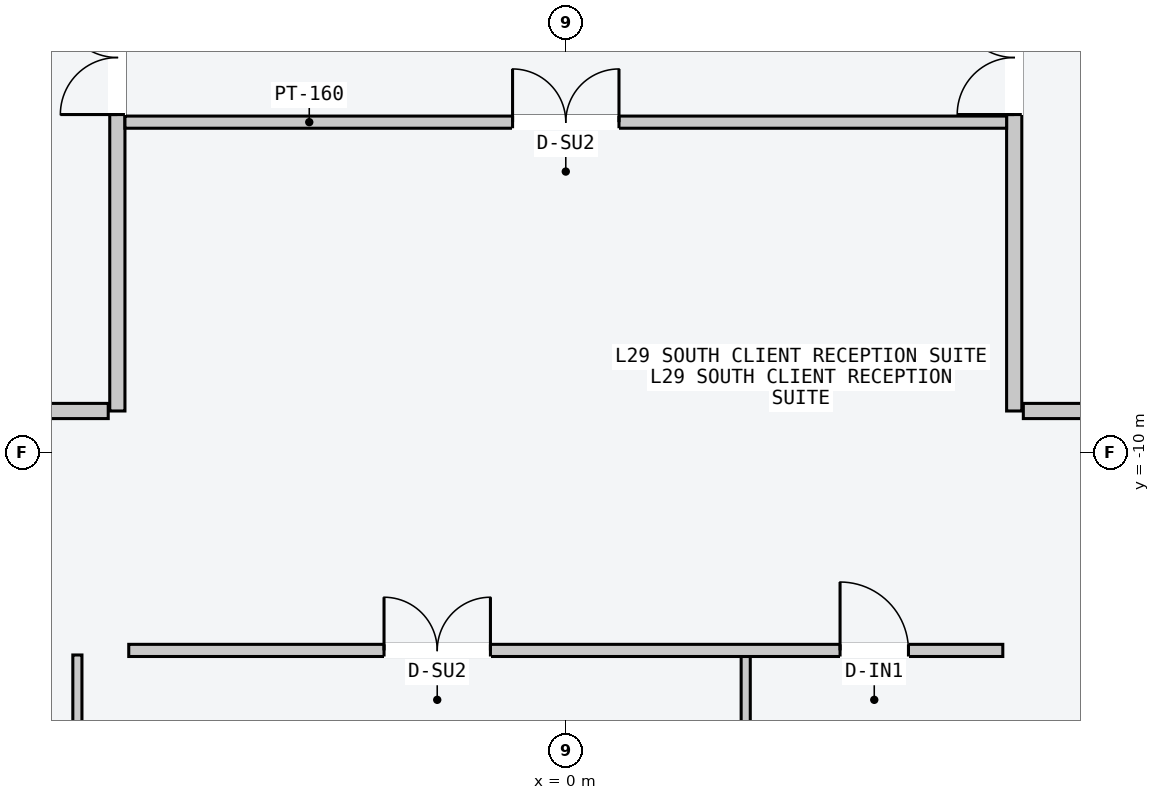
"""IFC4 building model, lengths in metres.
Left out: names, types, materials, properties, quantities, classifications, styles, units other than length and angle.
Written with IfcOpenShell. Run it as: python <this file> out.ifc"""

import sys

from ifc_helpers import new_model, si_unit, direction, frame, frame_2d, origin, place, context, subcontext, project, spatial, rectangle, extrude, element, fill, save


model = new_model("IFC4")
c1 = context("Model", 3, precision=1e-05, world=origin(), true_north=direction((0.0, 1.0)))
c2 = subcontext(c1, "Body", "Model", "MODEL_VIEW")
j1 = project(units=[si_unit("LENGTHUNIT", "METRE"), si_unit("PLANEANGLEUNIT", "RADIAN")], contexts=[c1])
p1 = place(None, origin())
s1 = spatial("IfcSite", under=j1, at=p1, CompositionType="ELEMENT")
p2 = place(p1, origin())
s2 = spatial("IfcBuilding", under=s1, at=p2, CompositionType="ELEMENT")
p3 = place(p2, frame((0.0, 0.0, 113.4)))
s3 = spatial("IfcBuildingStorey", under=s2, at=p3, CompositionType="ELEMENT", Elevation=113.4)
p4 = place(p3, frame((-5.9, -9.45, 0.0), z_axis=(0.0, 0.0, 1.0), x_axis=(0.0, 1.0, 0.0)))
e1 = element("IfcWall", 1, at=p4, inside=s3, PredefinedType="PARTITIONING", context=c2, shape_type="SweptSolid", body=[
    extrude(rectangle(XDim=10.5, YDim=0.2, at=frame_2d((5.25, 0.0))), origin(), (0.0, 0.0, 1.0), 3.4),
])
p5 = place(p4, frame((3.9, 0.0, 0.0)))
e2 = element("IfcOpeningElement", 2, at=p5, cuts=e1, PredefinedType="OPENING", context=c2, shape_type="SweptSolid", body=[
    extrude(rectangle(XDim=1.5, YDim=2.2, at=frame_2d((0.75, 1.1))), frame((0.0, 0.11, 0.0), z_axis=(0.0, -1.0, 0.0), x_axis=(1.0, 0.0, 0.0)), (0.0, 0.0, 1.0), 0.22),
])
p6 = place(p3, frame((-6.02, -9.45, 0.0), z_axis=(0.0, 0.0, 1.0), x_axis=(-1.0, 0.0, 0.0)))
e3 = element("IfcWall", 3, at=p6, inside=s3, PredefinedType="PARTITIONING", context=c2, shape_type="SweptSolid", body=[
    extrude(rectangle(XDim=1.8, YDim=0.2, at=frame_2d((0.9, 0.0))), origin(), (0.0, 0.0, 1.0), 3.4),
])
p7 = place(p3, frame((5.9, -9.45, 0.0), z_axis=(0.0, 0.0, 1.0), x_axis=(0.0, 1.0, 0.0)))
e4 = element("IfcWall", 4, at=p7, inside=s3, PredefinedType="PARTITIONING", context=c2, shape_type="SweptSolid", body=[
    extrude(rectangle(XDim=18.9, YDim=0.2, at=frame_2d((9.45, 0.0))), origin(), (0.0, 0.0, 1.0), 3.4),
])
p8 = place(p7, frame((3.9, 0.0, 0.0)))
e5 = element("IfcOpeningElement", 5, at=p8, cuts=e4, PredefinedType="OPENING", context=c2, shape_type="SweptSolid", body=[
    extrude(rectangle(XDim=1.5, YDim=2.2, at=frame_2d((0.75, 1.1))), frame((0.0, 0.11, 0.0), z_axis=(0.0, -1.0, 0.0), x_axis=(1.0, 0.0, 0.0)), (0.0, 0.0, 1.0), 0.22),
])
p9 = place(p3, frame((6.02, -9.45, 0.0), z_axis=(0.0, 0.0, 1.0), x_axis=(1.0, 0.0, 0.0)))
e6 = element("IfcWall", 6, at=p9, inside=s3, PredefinedType="PARTITIONING", context=c2, shape_type="SweptSolid", body=[
    extrude(rectangle(XDim=1.8, YDim=0.2, at=frame_2d((0.9, 0.0))), origin(), (0.0, 0.0, 1.0), 3.4),
])
p10 = place(p3, frame((-5.8, -5.65, 0.0), z_axis=(0.0, 0.0, 1.0), x_axis=(1.0, 0.0, 0.0)))
e7 = element("IfcWall", 7, at=p10, inside=s3, PredefinedType="PARTITIONING", context=c2, shape_type="SweptSolid", body=[
    extrude(rectangle(XDim=11.6, YDim=0.16, at=frame_2d((5.8, 0.0))), origin(), (0.0, 0.0, 1.0), 3.4),
])
p11 = place(p10, frame((5.1, 0.0, 0.0)))
e8 = element("IfcOpeningElement", 8, at=p11, cuts=e7, PredefinedType="OPENING", context=c2, shape_type="SweptSolid", body=[
    extrude(rectangle(XDim=1.4, YDim=2.2, at=frame_2d((0.7, 1.1))), frame((0.0, 0.09, 0.0), z_axis=(0.0, -1.0, 0.0), x_axis=(1.0, 0.0, 0.0)), (0.0, 0.0, 1.0), 0.18),
])
p12 = place(p3, frame((-6.426, -19.56, 0.0), z_axis=(0.0, 0.0, 1.0), x_axis=(0.0, 1.0, 0.0)))
e9 = element("IfcWall", 9, at=p12, inside=s3, PredefinedType="PARTITIONING", context=c2, shape_type="SweptSolid", body=[
    extrude(rectangle(XDim=6.9, YDim=0.12, at=frame_2d((3.45, 0.0))), origin(), (0.0, 0.0, 1.0), 3.4),
])
p13 = place(p12, frame((1.34, 0.0, 0.0)))
e10 = element("IfcOpeningElement", 10, at=p13, cuts=e9, PredefinedType="OPENING", context=c2, shape_type="SweptSolid", body=[
    extrude(rectangle(XDim=0.96, YDim=2.18, at=frame_2d((0.48, 1.09))), frame((0.0, 0.07, 0.0), z_axis=(0.0, -1.0, 0.0), x_axis=(1.0, 0.0, 0.0)), (0.0, 0.0, 1.0), 0.14),
])
p14 = place(p3, frame((2.367, -19.56, 0.0), z_axis=(0.0, 0.0, 1.0), x_axis=(0.0, 1.0, 0.0)))
e11 = element("IfcWall", 11, at=p14, inside=s3, PredefinedType="PARTITIONING", context=c2, shape_type="SweptSolid", body=[
    extrude(rectangle(XDim=6.9, YDim=0.12, at=frame_2d((3.45, 0.0))), origin(), (0.0, 0.0, 1.0), 3.4),
])
p15 = place(p14, frame((1.05, 0.0, 0.0)))
e12 = element("IfcOpeningElement", 12, at=p15, cuts=e11, PredefinedType="OPENING", context=c2, shape_type="SweptSolid", body=[
    extrude(rectangle(XDim=0.96, YDim=2.18, at=frame_2d((0.48, 1.09))), frame((0.0, 0.07, 0.0), z_axis=(0.0, -1.0, 0.0), x_axis=(1.0, 0.0, 0.0)), (0.0, 0.0, 1.0), 0.14),
])
p16 = place(p3, frame((-5.75, -12.6, 0.0), z_axis=(0.0, 0.0, 1.0), x_axis=(1.0, 0.0, 0.0)))
e13 = element("IfcWall", 13, at=p16, inside=s3, PredefinedType="PARTITIONING", context=c2, shape_type="SweptSolid", body=[
    extrude(rectangle(XDim=11.5, YDim=0.16, at=frame_2d((5.75, 0.0))), origin(), (0.0, 0.0, 1.0), 3.4),
])
p17 = place(p16, frame((3.359, 0.0, 0.0)))
e14 = element("IfcOpeningElement", 14, at=p17, cuts=e13, PredefinedType="OPENING", context=c2, shape_type="SweptSolid", body=[
    extrude(rectangle(XDim=1.4, YDim=2.2, at=frame_2d((0.7, 1.1))), frame((0.0, 0.09, 0.0), z_axis=(0.0, -1.0, 0.0), x_axis=(1.0, 0.0, 0.0)), (0.0, 0.0, 1.0), 0.18),
])
p18 = place(p16, frame((9.359, 0.0, 0.0)))
e15 = element("IfcOpeningElement", 15, at=p18, cuts=e13, PredefinedType="OPENING", context=c2, shape_type="SweptSolid", body=[
    extrude(rectangle(XDim=0.9, YDim=2.15, at=frame_2d((0.45, 1.075))), frame((0.0, 0.09, 0.0), z_axis=(0.0, -1.0, 0.0), x_axis=(1.0, 0.0, 0.0)), (0.0, 0.0, 1.0), 0.18),
])
p19 = place(p5, origin())
e16 = element("IfcDoor", 16, at=p19, inside=s3, OperationType="DOUBLE_DOOR_SINGLE_SWING", PredefinedType="DOOR", context=c2, shape_type="SweptSolid", body=[
    extrude(rectangle(XDim=1.5, YDim=2.2, at=frame_2d((0.75, 1.1))), frame((0.0, 0.025, 0.0), z_axis=(0.0, -1.0, 0.0), x_axis=(1.0, 0.0, 0.0)), (0.0, 0.0, 1.0), 0.05),
])
fill(e2, e16)
p20 = place(p8, origin())
e17 = element("IfcDoor", 17, at=p20, inside=s3, OperationType="DOUBLE_DOOR_SINGLE_SWING", PredefinedType="DOOR", context=c2, shape_type="SweptSolid", body=[
    extrude(rectangle(XDim=1.5, YDim=2.2, at=frame_2d((0.75, 1.1))), frame((0.0, 0.025, 0.0), z_axis=(0.0, -1.0, 0.0), x_axis=(1.0, 0.0, 0.0)), (0.0, 0.0, 1.0), 0.05),
])
fill(e5, e17)
p21 = place(p11, origin())
e18 = element("IfcDoor", 18, at=p21, inside=s3, OperationType="DOUBLE_DOOR_SINGLE_SWING", PredefinedType="DOOR", context=c2, shape_type="SweptSolid", body=[
    extrude(rectangle(XDim=1.4, YDim=2.2, at=frame_2d((0.7, 1.1))), frame((0.0, 0.025, 0.0), z_axis=(0.0, -1.0, 0.0), x_axis=(1.0, 0.0, 0.0)), (0.0, 0.0, 1.0), 0.05),
])
fill(e8, e18)
p22 = place(p17, origin())
e19 = element("IfcDoor", 19, at=p22, inside=s3, OperationType="DOUBLE_DOOR_SINGLE_SWING", PredefinedType="DOOR", context=c2, shape_type="SweptSolid", body=[
    extrude(rectangle(XDim=1.4, YDim=2.2, at=frame_2d((0.7, 1.1))), frame((0.0, 0.025, 0.0), z_axis=(0.0, -1.0, 0.0), x_axis=(1.0, 0.0, 0.0)), (0.0, 0.0, 1.0), 0.05),
])
fill(e14, e19)
p23 = place(p18, origin())
e20 = element("IfcDoor", 20, at=p23, inside=s3, OperationType="SINGLE_SWING_LEFT", PredefinedType="DOOR", context=c2, shape_type="SweptSolid", body=[
    extrude(rectangle(XDim=0.9, YDim=2.15, at=frame_2d((0.45, 1.075))), frame((0.0, 0.025, 0.0), z_axis=(0.0, -1.0, 0.0), x_axis=(1.0, 0.0, 0.0)), (0.0, 0.0, 1.0), 0.05),
])
fill(e15, e20)
save(model, sys.argv[1])
